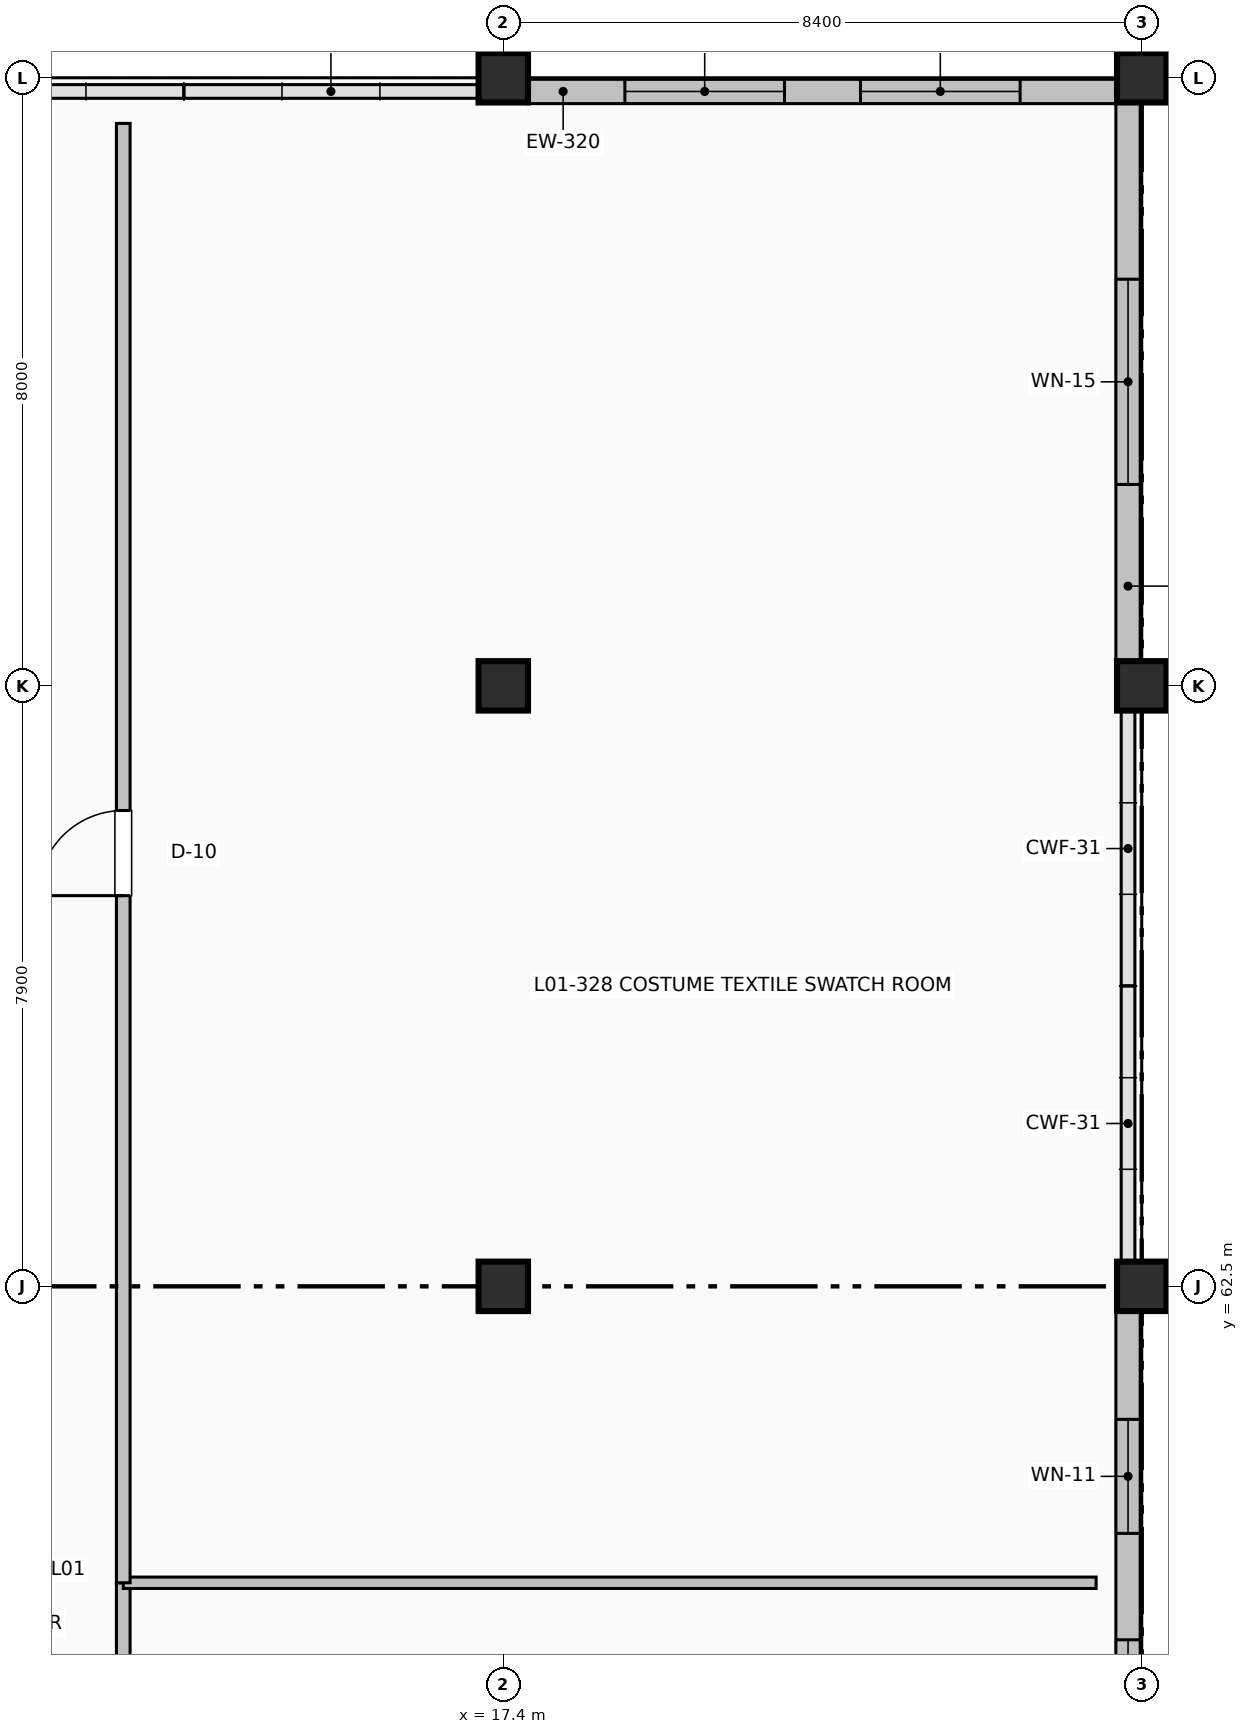
"""IFC4 building model, lengths in metres.
Left out: names, types, materials, properties, quantities, classifications, styles, units other than length and angle.
Written with IfcOpenShell. Run it as: python <this file> out.ifc"""

import sys

from ifc_helpers import new_model, si_unit, direction, frame, frame_2d, origin, origin_2d, place, context, subcontext, project, spatial, rectangle, extrude, element, fill, save


model = new_model("IFC4")
c1 = context("Model", 3, precision=1e-05, world=origin(), true_north=direction((0.0, 1.0)))
c2 = subcontext(c1, "Body", "Model", "MODEL_VIEW")
j1 = project(units=[si_unit("LENGTHUNIT", "METRE"), si_unit("PLANEANGLEUNIT", "RADIAN")], contexts=[c1])
p1 = place(None, origin())
s1 = spatial("IfcSite", under=j1, at=p1, CompositionType="ELEMENT")
p2 = place(p1, origin())
s2 = spatial("IfcBuilding", under=s1, at=p2, CompositionType="ELEMENT")
p3 = place(p2, frame((0.0, 0.0, 5.4)))
s3 = spatial("IfcBuildingStorey", under=s2, at=p3, CompositionType="ELEMENT", Elevation=5.4)
for number, where, z_axis, x_axis in (
    (1, (17.4, 62.5, 0.0), (0.0, 0.0, 1.0), (1.0, 0.0, 0.0)),
    (2, (17.4, 70.4, 0.0), (0.0, 0.0, 1.0), (1.0, 0.0, 0.0)),
    (3, (17.4, 78.4, 0.0), (0.0, 0.0, 1.0), (1.0, 0.0, 0.0)),
    (4, (25.8, 62.5, 0.0), (0.0, 0.0, 1.0), (1.0, 0.0, 0.0)),
    (5, (25.8, 70.4, 0.0), (0.0, 0.0, 1.0), (1.0, 0.0, 0.0)),
    (6, (25.8, 78.4, 0.0), (0.0, 0.0, 1.0), (1.0, 0.0, 0.0)),
):
    element("IfcColumn", number, at=place(p3, frame(where, z_axis=z_axis, x_axis=x_axis)), inside=s3, PredefinedType="COLUMN", context=c2, shape_type="SweptSolid", body=[
        extrude(rectangle(XDim=0.65, YDim=0.65, at=origin_2d()), origin(), (0.0, 0.0, 1.0), 4.8),
    ])
p4 = place(p3, frame((17.725, 78.22, 0.0), z_axis=(0.0, 0.0, 1.0), x_axis=(1.0, 0.0, 0.0)))
e7 = element("IfcWall", 7, at=p4, inside=s3, PredefinedType="SOLIDWALL", context=c2, shape_type="SweptSolid", body=[
    extrude(rectangle(XDim=7.75, YDim=0.32, at=frame_2d((3.875, 0.0))), origin(), (0.0, 0.0, 1.0), 3.642),
])
p5 = place(p4, frame((1.275, 0.0, 0.95)))
e8 = element("IfcOpeningElement", 8, at=p5, cuts=e7, PredefinedType="OPENING", context=c2, shape_type="SweptSolid", body=[
    extrude(rectangle(XDim=2.1, YDim=1.9, at=frame_2d((1.05, 0.95))), frame((0.0, 0.17, 0.0), z_axis=(0.0, -1.0, 0.0), x_axis=(1.0, 0.0, 0.0)), (0.0, 0.0, 1.0), 0.34),
])
p6 = place(p4, frame((4.375, 0.0, 0.95)))
e9 = element("IfcOpeningElement", 9, at=p6, cuts=e7, PredefinedType="OPENING", context=c2, shape_type="SweptSolid", body=[
    extrude(rectangle(XDim=2.1, YDim=1.9, at=frame_2d((1.05, 0.95))), frame((0.0, 0.17, 0.0), z_axis=(0.0, -1.0, 0.0), x_axis=(1.0, 0.0, 0.0)), (0.0, 0.0, 1.0), 0.34),
])
p7 = place(p3, frame((25.62, 78.075, 0.0), z_axis=(0.0, 0.0, 1.0), x_axis=(0.0, -1.0, 0.0)))
e10 = element("IfcWall", 10, at=p7, inside=s3, PredefinedType="SOLIDWALL", context=c2, shape_type="SweptSolid", body=[
    extrude(rectangle(XDim=7.35, YDim=0.32, at=frame_2d((3.675, 0.0))), origin(), (0.0, 0.0, 1.0), 3.642),
])
p8 = place(p7, frame((2.325, 0.0, 0.95)))
e11 = element("IfcOpeningElement", 11, at=p8, cuts=e10, PredefinedType="OPENING", context=c2, shape_type="SweptSolid", body=[
    extrude(rectangle(XDim=2.7, YDim=1.9, at=frame_2d((1.35, 0.95))), frame((0.0, 0.17, 0.0), z_axis=(0.0, -1.0, 0.0), x_axis=(1.0, 0.0, 0.0)), (0.0, 0.0, 1.0), 0.34),
])
p9 = place(p3, frame((25.62, 62.175, 0.0), z_axis=(0.0, 0.0, 1.0), x_axis=(0.0, -1.0, 0.0)))
e12 = element("IfcWall", 12, at=p9, inside=s3, PredefinedType="SOLIDWALL", context=c2, shape_type="SweptSolid", body=[
    extrude(rectangle(XDim=7.25, YDim=0.32, at=frame_2d((3.625, 0.0))), origin(), (0.0, 0.0, 1.0), 3.642),
])
p10 = place(p9, frame((1.425, 0.0, 0.95)))
e13 = element("IfcOpeningElement", 13, at=p10, cuts=e12, PredefinedType="OPENING", context=c2, shape_type="SweptSolid", body=[
    extrude(rectangle(XDim=1.5, YDim=1.9, at=frame_2d((0.75, 0.95))), frame((0.0, 0.17, 0.0), z_axis=(0.0, -1.0, 0.0), x_axis=(1.0, 0.0, 0.0)), (0.0, 0.0, 1.0), 0.34),
])
p11 = place(p9, frame((4.325, 0.0, 0.95)))
e14 = element("IfcOpeningElement", 14, at=p11, cuts=e12, PredefinedType="OPENING", context=c2, shape_type="SweptSolid", body=[
    extrude(rectangle(XDim=1.5, YDim=1.9, at=frame_2d((0.75, 0.95))), frame((0.0, 0.17, 0.0), z_axis=(0.0, -1.0, 0.0), x_axis=(1.0, 0.0, 0.0)), (0.0, 0.0, 1.0), 0.34),
])
p12 = place(p3, frame((12.4, 39.4, 0.0), z_axis=(0.0, 0.0, 1.0), x_axis=(0.0, 1.0, 0.0)))
e15 = element("IfcWall", 15, at=p12, inside=s3, PredefinedType="PARTITIONING", context=c2, shape_type="SweptSolid", body=[
    extrude(rectangle(XDim=19.2, YDim=0.18, at=frame_2d((9.6, 0.0))), origin(), (0.0, 0.0, 1.0), 4.492),
])
p13 = place(p12, frame((9.075, 0.0, 0.0)))
e16 = element("IfcOpeningElement", 16, at=p13, cuts=e15, PredefinedType="OPENING", context=c2, shape_type="SweptSolid", body=[
    extrude(rectangle(XDim=1.05, YDim=2.1, at=frame_2d((0.525, 1.05))), frame((0.0, 0.1, 0.0), z_axis=(0.0, -1.0, 0.0), x_axis=(1.0, 0.0, 0.0)), (0.0, 0.0, 1.0), 0.2),
])
p14 = place(p3, frame((12.4, 58.6, 0.0), z_axis=(0.0, 0.0, 1.0), x_axis=(1.0, 0.0, 0.0)))
e17 = element("IfcWall", 17, at=p14, inside=s3, PredefinedType="PARTITIONING", context=c2, shape_type="SweptSolid", body=[
    extrude(rectangle(XDim=12.8, YDim=0.15, at=frame_2d((6.4, 0.0))), origin(), (0.0, 0.0, 1.0), 3.892),
])
p15 = place(p3, frame((12.4, 58.6, 0.0), z_axis=(0.0, 0.0, 1.0), x_axis=(0.0, 1.0, 0.0)))
e18 = element("IfcWall", 18, at=p15, inside=s3, PredefinedType="PARTITIONING", context=c2, shape_type="SweptSolid", body=[
    extrude(rectangle(XDim=19.2, YDim=0.18, at=frame_2d((9.6, 0.0))), origin(), (0.0, 0.0, 1.0), 4.492),
])
p16 = place(p15, frame((9.04, 0.0, 0.0)))
e19 = element("IfcOpeningElement", 19, at=p16, cuts=e18, PredefinedType="OPENING", context=c2, shape_type="SweptSolid", body=[
    extrude(rectangle(XDim=1.12, YDim=2.12, at=frame_2d((0.56, 1.06))), frame((0.0, 0.1, 0.0), z_axis=(0.0, -1.0, 0.0), x_axis=(1.0, 0.0, 0.0)), (0.0, 0.0, 1.0), 0.2),
])
p17 = place(p5, origin())
e20 = element("IfcWindow", 20, at=p17, inside=s3, PartitioningType="SINGLE_PANEL", PredefinedType="WINDOW", context=c2, shape_type="SweptSolid", body=[
    extrude(rectangle(XDim=2.1, YDim=1.9, at=frame_2d((1.05, 0.95))), frame((0.0, 0.03, 0.0), z_axis=(0.0, -1.0, 0.0), x_axis=(1.0, 0.0, 0.0)), (0.0, 0.0, 1.0), 0.06),
])
fill(e8, e20)
p18 = place(p6, origin())
e21 = element("IfcWindow", 21, at=p18, inside=s3, PartitioningType="SINGLE_PANEL", PredefinedType="WINDOW", context=c2, shape_type="SweptSolid", body=[
    extrude(rectangle(XDim=2.1, YDim=1.9, at=frame_2d((1.05, 0.95))), frame((0.0, 0.03, 0.0), z_axis=(0.0, -1.0, 0.0), x_axis=(1.0, 0.0, 0.0)), (0.0, 0.0, 1.0), 0.06),
])
fill(e9, e21)
p19 = place(p8, origin())
e22 = element("IfcWindow", 22, at=p19, inside=s3, PartitioningType="SINGLE_PANEL", PredefinedType="WINDOW", context=c2, shape_type="SweptSolid", body=[
    extrude(rectangle(XDim=2.7, YDim=1.9, at=frame_2d((1.35, 0.95))), frame((0.0, 0.03, 0.0), z_axis=(0.0, -1.0, 0.0), x_axis=(1.0, 0.0, 0.0)), (0.0, 0.0, 1.0), 0.06),
])
fill(e11, e22)
p20 = place(p10, origin())
e23 = element("IfcWindow", 23, at=p20, inside=s3, PartitioningType="SINGLE_PANEL", PredefinedType="WINDOW", context=c2, shape_type="SweptSolid", body=[
    extrude(rectangle(XDim=1.5, YDim=1.9, at=frame_2d((0.75, 0.95))), frame((0.0, 0.03, 0.0), z_axis=(0.0, -1.0, 0.0), x_axis=(1.0, 0.0, 0.0)), (0.0, 0.0, 1.0), 0.06),
])
fill(e13, e23)
p21 = place(p11, origin())
e24 = element("IfcWindow", 24, at=p21, inside=s3, PartitioningType="SINGLE_PANEL", PredefinedType="WINDOW", context=c2, shape_type="SweptSolid", body=[
    extrude(rectangle(XDim=1.5, YDim=1.9, at=frame_2d((0.75, 0.95))), frame((0.0, 0.03, 0.0), z_axis=(0.0, -1.0, 0.0), x_axis=(1.0, 0.0, 0.0)), (0.0, 0.0, 1.0), 0.06),
])
fill(e14, e24)
p22 = place(p16, origin())
e25 = element("IfcDoor", 25, at=p22, inside=s3, OperationType="SINGLE_SWING_LEFT", PredefinedType="DOOR", context=c2, shape_type="SweptSolid", body=[
    extrude(rectangle(XDim=1.12, YDim=2.12, at=frame_2d((0.56, 1.06))), frame((0.0, 0.025, 0.0), z_axis=(0.0, -1.0, 0.0), x_axis=(1.0, 0.0, 0.0)), (0.0, 0.0, 1.0), 0.05),
])
fill(e19, e25)
save(model, sys.argv[1])
